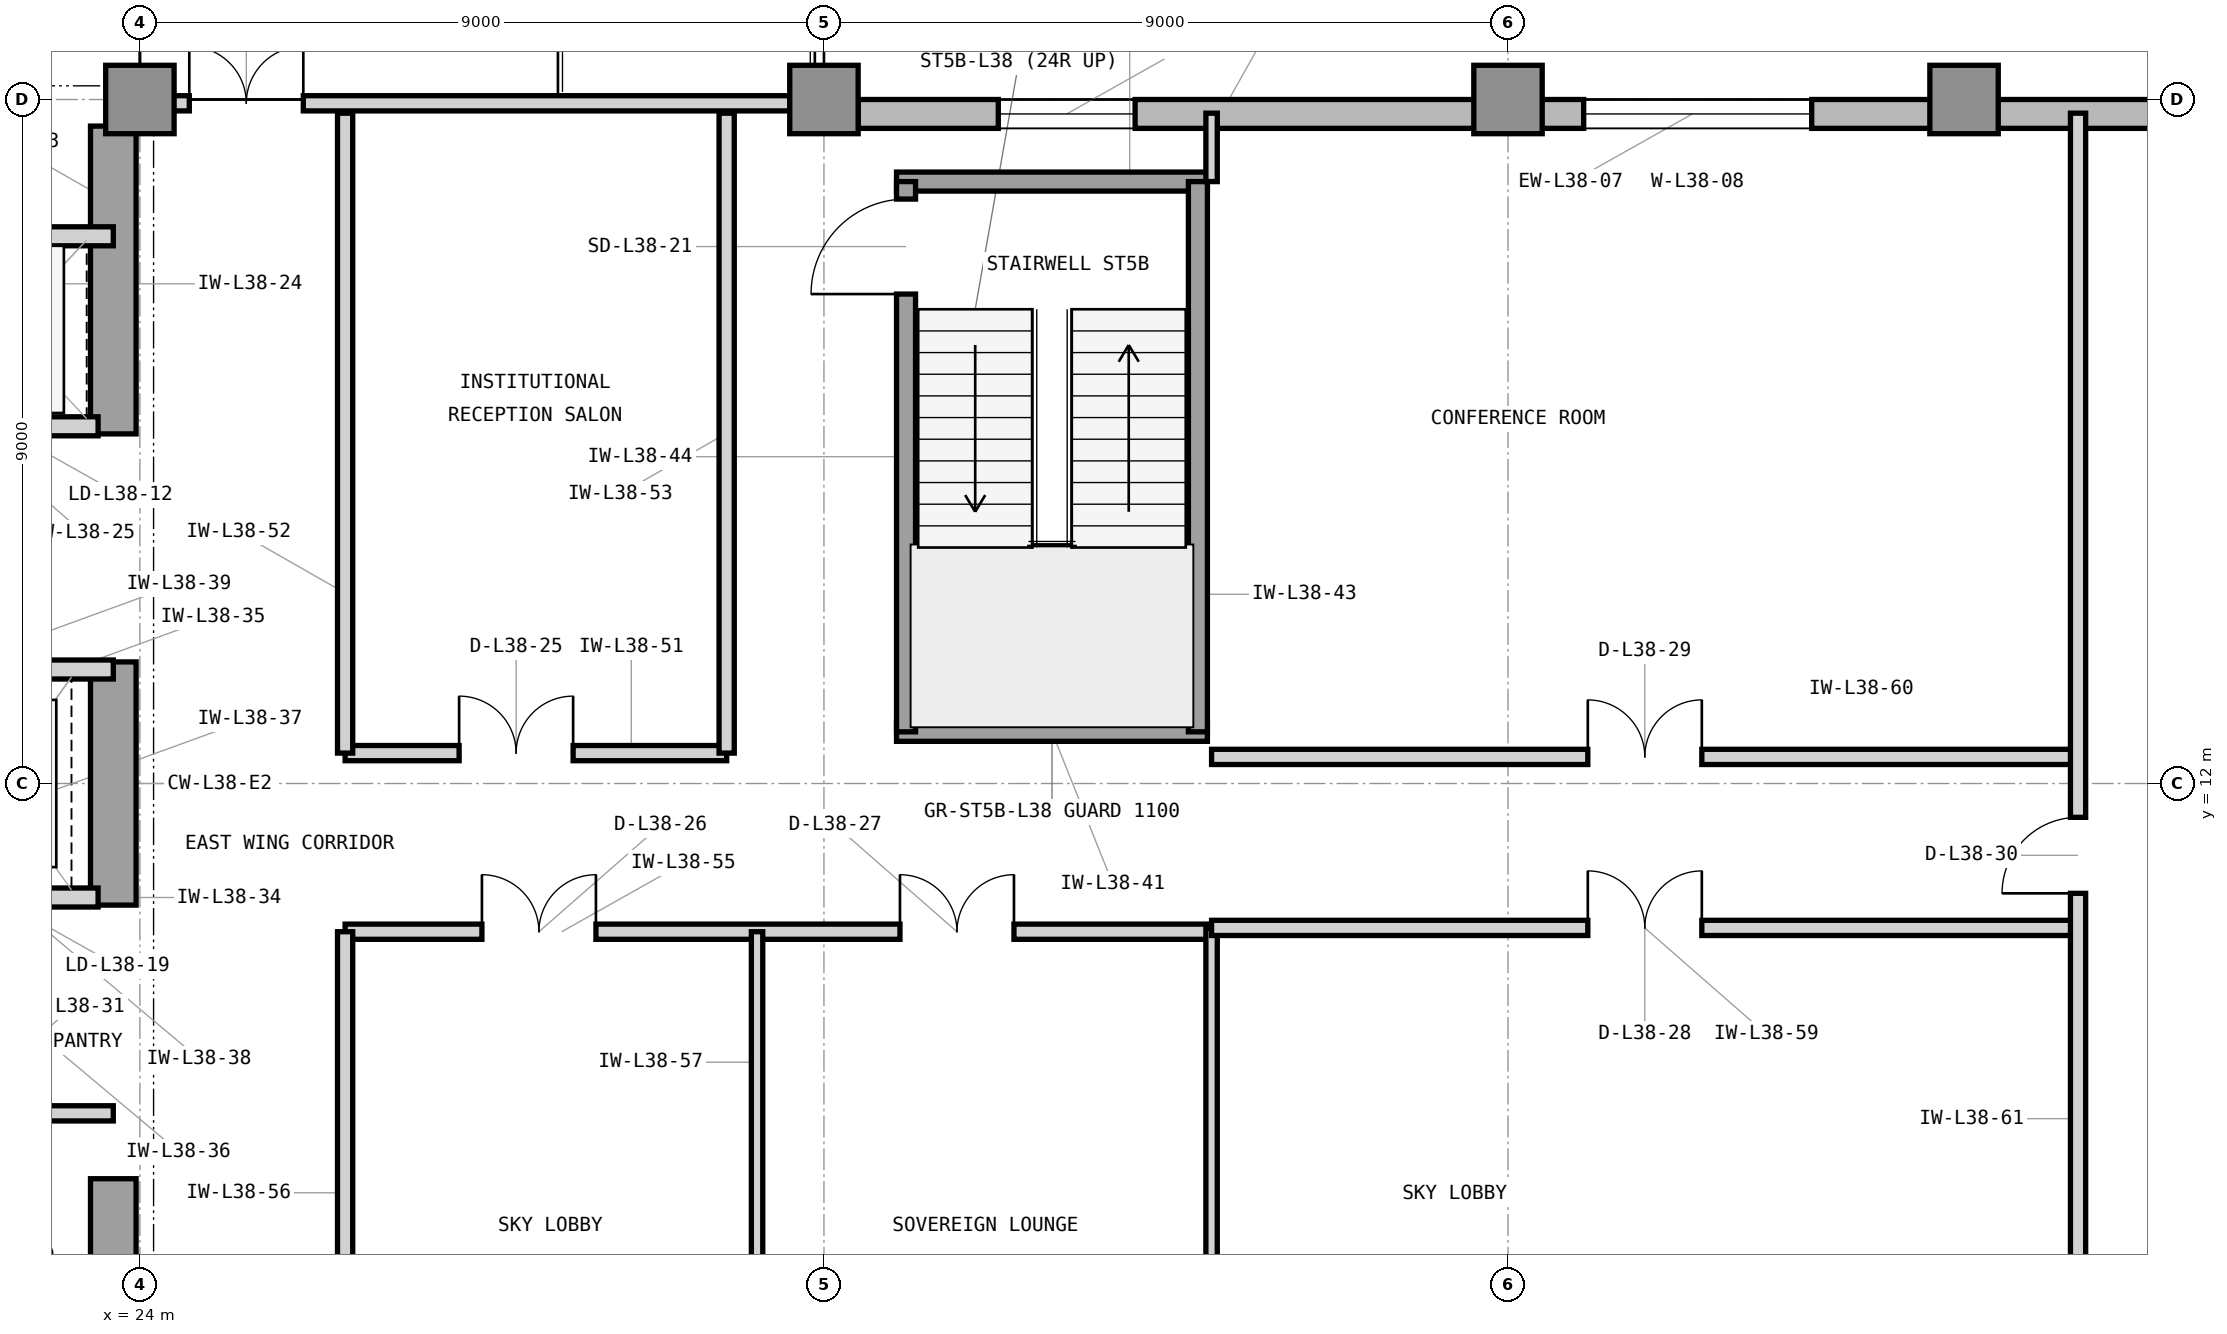
"""IFC4 building model, lengths in metres.
Left out: names, types, materials, properties, quantities, classifications, styles, units other than length and angle.
Written with IfcOpenShell. Run it as: python <this file> out.ifc"""

import sys

from ifc_helpers import new_model, si_unit, direction, frame, frame_2d, origin, origin_2d, place, context, subcontext, project, spatial, rectangle, extrude, element, fill, save


model = new_model("IFC4")
c1 = context("Model", 3, precision=1e-05, world=origin(), true_north=direction((0.0, 1.0)))
c2 = subcontext(c1, "Body", "Model", "MODEL_VIEW")
j1 = project(units=[si_unit("LENGTHUNIT", "METRE"), si_unit("PLANEANGLEUNIT", "RADIAN")], contexts=[c1])
p1 = place(None, origin())
s1 = spatial("IfcSite", under=j1, at=p1, CompositionType="ELEMENT")
p2 = place(p1, origin())
s2 = spatial("IfcBuilding", under=s1, at=p2, CompositionType="ELEMENT")
p3 = place(p2, frame((0.0, 0.0, 160.2)))
s3 = spatial("IfcBuildingStorey", under=s2, at=p3, CompositionType="ELEMENT", Elevation=160.2)
p4 = place(p3, frame((23.65, 3.65, 0.0), z_axis=(0.0, 0.0, 1.0), x_axis=(0.0, 1.0, 0.0)))
e1 = element("IfcWall", 1, at=p4, inside=s3, PredefinedType="SHEAR", context=c2, shape_type="SweptSolid", body=[
    extrude(rectangle(XDim=3.15, YDim=0.6, at=frame_2d((1.575, 0.0))), origin(), (0.0, 0.0, 1.0), 4.2),
])
p5 = place(p3, frame((23.65, 10.4, 0.0), z_axis=(0.0, 0.0, 1.0), x_axis=(0.0, 1.0, 0.0)))
e2 = element("IfcWall", 2, at=p5, inside=s3, PredefinedType="SHEAR", context=c2, shape_type="SweptSolid", body=[
    extrude(rectangle(XDim=3.2, YDim=0.6, at=frame_2d((1.6, 0.0))), origin(), (0.0, 0.0, 1.0), 4.2),
])
p6 = place(p3, frame((23.65, 16.6, 0.0), z_axis=(0.0, 0.0, 1.0), x_axis=(0.0, 1.0, 0.0)))
e3 = element("IfcWall", 3, at=p6, inside=s3, PredefinedType="SHEAR", context=c2, shape_type="SweptSolid", body=[
    extrude(rectangle(XDim=4.05, YDim=0.6, at=frame_2d((2.025, 0.0))), origin(), (0.0, 0.0, 1.0), 4.2),
])
for number, where, z_axis, x_axis in (
    (4, (24.0, 21.0, 0.0), (0.0, 0.0, 1.0), (1.0, 0.0, 0.0)),
    (5, (33.0, 21.0, 0.0), (0.0, 0.0, 1.0), (1.0, 0.0, 0.0)),
    (6, (42.0, 21.0, 0.0), (0.0, 0.0, 1.0), (1.0, 0.0, 0.0)),
    (7, (48.0, 21.0, 0.0), (0.0, 0.0, 1.0), (1.0, 0.0, 0.0)),
):
    element("IfcColumn", number, at=place(p3, frame(where, z_axis=z_axis, x_axis=x_axis)), inside=s3, PredefinedType="COLUMN", context=c2, shape_type="SweptSolid", body=[
        extrude(rectangle(XDim=0.9, YDim=0.9, at=origin_2d()), origin(), (0.0, 0.0, 1.0), 4.2),
    ])
p7 = place(p3, frame((55.4, 20.81, 0.0), z_axis=(0.0, 0.0, 1.0), x_axis=(-1.0, 0.0, 0.0)))
e8 = element("IfcWall", 8, at=p7, inside=s3, PredefinedType="STANDARD", context=c2, shape_type="SweptSolid", body=[
    extrude(rectangle(XDim=21.95, YDim=0.38, at=frame_2d((10.975, 0.0))), origin(), (0.0, 0.0, 1.0), 4.0),
])
p8 = place(p7, frame((18.306, 0.0, 0.85)))
e9 = element("IfcOpeningElement", 9, at=p8, cuts=e8, PredefinedType="OPENING", context=c2, shape_type="SweptSolid", body=[
    extrude(rectangle(XDim=1.8, YDim=2.25, at=frame_2d((0.9, 1.125))), frame((0.0, 0.2, 0.0), z_axis=(0.0, -1.0, 0.0), x_axis=(1.0, 0.0, 0.0)), (0.0, 0.0, 1.0), 0.4),
])
p9 = place(p7, frame((9.404, 0.0, 0.7)))
e10 = element("IfcOpeningElement", 10, at=p9, cuts=e8, PredefinedType="OPENING", context=c2, shape_type="SweptSolid", body=[
    extrude(rectangle(XDim=3.0, YDim=2.6, at=frame_2d((1.5, 1.3))), frame((0.0, 0.2, 0.0), z_axis=(0.0, -1.0, 0.0), x_axis=(1.0, 0.0, 0.0)), (0.0, 0.0, 1.0), 0.4),
])
p10 = place(p3, frame((21.05, 16.7, 0.0), z_axis=(0.0, 0.0, 1.0), x_axis=(1.0, 0.0, 0.0)))
e11 = element("IfcWall", 11, at=p10, inside=s3, PredefinedType="PARTITIONING", context=c2, shape_type="SweptSolid", body=[
    extrude(rectangle(XDim=2.4, YDim=0.25, at=frame_2d((1.2, 0.0))), origin(), (0.0, 0.0, 1.0), 3.583),
])
p11 = place(p10, frame((0.52, 0.0, 0.0)))
e12 = element("IfcOpeningElement", 12, at=p11, cuts=e11, PredefinedType="OPENING", context=c2, shape_type="SweptSolid", body=[
    extrude(rectangle(XDim=1.15, YDim=2.25, at=frame_2d((0.575, 1.125))), frame((0.0, 0.135, 0.0), z_axis=(0.0, -1.0, 0.0), x_axis=(1.0, 0.0, 0.0)), (0.0, 0.0, 1.0), 0.27),
])
p12 = place(p3, frame((16.45, 19.2, 0.0), z_axis=(0.0, 0.0, 1.0), x_axis=(1.0, 0.0, 0.0)))
e13 = element("IfcWall", 13, at=p12, inside=s3, PredefinedType="PARTITIONING", context=c2, shape_type="SweptSolid", body=[
    extrude(rectangle(XDim=7.2, YDim=0.25, at=frame_2d((3.6, 0.0))), origin(), (0.0, 0.0, 1.0), 3.93),
])
p13 = place(p3, frame((20.8, 7.66, 0.0), z_axis=(0.0, 0.0, 1.0), x_axis=(1.0, 0.0, 0.0)))
e14 = element("IfcWall", 14, at=p13, inside=s3, PredefinedType="PARTITIONING", context=c2, shape_type="SweptSolid", body=[
    extrude(rectangle(XDim=2.85, YDim=0.2, at=frame_2d((1.425, 0.0))), origin(), (0.0, 0.0, 1.0), 3.93),
])
p14 = place(p13, frame((0.95, 0.0, 0.0)))
e15 = element("IfcOpeningElement", 15, at=p14, cuts=e14, PredefinedType="OPENING", context=c2, shape_type="SweptSolid", body=[
    extrude(rectangle(XDim=0.95, YDim=2.1, at=frame_2d((0.475, 1.05))), frame((0.0, 0.11, 0.0), z_axis=(0.0, -1.0, 0.0), x_axis=(1.0, 0.0, 0.0)), (0.0, 0.0, 1.0), 0.22),
])
p15 = place(p3, frame((21.05, 10.5, 0.0), z_axis=(0.0, 0.0, 1.0), x_axis=(1.0, 0.0, 0.0)))
e16 = element("IfcWall", 16, at=p15, inside=s3, PredefinedType="PARTITIONING", context=c2, shape_type="SweptSolid", body=[
    extrude(rectangle(XDim=2.4, YDim=0.25, at=frame_2d((1.2, 0.0))), origin(), (0.0, 0.0, 1.0), 3.583),
])
p16 = place(p15, frame((0.48, 0.0, 0.0)))
e17 = element("IfcOpeningElement", 17, at=p16, cuts=e16, PredefinedType="OPENING", context=c2, shape_type="SweptSolid", body=[
    extrude(rectangle(XDim=1.15, YDim=2.25, at=frame_2d((0.575, 1.125))), frame((0.0, 0.135, 0.0), z_axis=(0.0, -1.0, 0.0), x_axis=(1.0, 0.0, 0.0)), (0.0, 0.0, 1.0), 0.27),
])
p17 = place(p3, frame((14.7, 13.5, 0.0), z_axis=(0.0, 0.0, 1.0), x_axis=(1.0, 0.0, 0.0)))
e18 = element("IfcWall", 18, at=p17, inside=s3, PredefinedType="PARTITIONING", context=c2, shape_type="SweptSolid", body=[
    extrude(rectangle(XDim=8.95, YDim=0.25, at=frame_2d((4.475, 0.0))), origin(), (0.0, 0.0, 1.0), 3.583),
])
for number, where, z_axis, x_axis in (
    (19, (33.955, 12.68, 0.0), (0.0, 0.0, 1.0), (1.0, 0.0, 0.0)),
    (20, (33.955, 19.92, 0.0), (0.0, 0.0, 1.0), (1.0, 0.0, 0.0)),
):
    element("IfcWall", number, at=place(p3, frame(where, z_axis=z_axis, x_axis=x_axis)), inside=s3, PredefinedType="SHEAR", context=c2, shape_type="SweptSolid", body=[
        extrude(rectangle(XDim=4.09, YDim=0.25, at=frame_2d((2.045, 0.0))), origin(), (0.0, 0.0, 1.0), 4.2),
    ])
p18 = place(p3, frame((37.92, 12.68, 0.0), z_axis=(0.0, 0.0, 1.0), x_axis=(0.0, 1.0, 0.0)))
e21 = element("IfcWall", 21, at=p18, inside=s3, PredefinedType="SHEAR", context=c2, shape_type="SweptSolid", body=[
    extrude(rectangle(XDim=7.24, YDim=0.25, at=frame_2d((3.62, 0.0))), origin(), (0.0, 0.0, 1.0), 4.2),
])
p19 = place(p3, frame((34.08, 12.68, 0.0), z_axis=(0.0, 0.0, 1.0), x_axis=(0.0, 1.0, 0.0)))
e22 = element("IfcWall", 22, at=p19, inside=s3, PredefinedType="SHEAR", context=c2, shape_type="SweptSolid", body=[
    extrude(rectangle(XDim=7.24, YDim=0.25, at=frame_2d((3.62, 0.0))), origin(), (0.0, 0.0, 1.0), 4.2),
])
p20 = place(p19, frame((5.76, 0.0, 0.0)))
e23 = element("IfcOpeningElement", 23, at=p20, cuts=e22, PredefinedType="OPENING", context=c2, shape_type="SweptSolid", body=[
    extrude(rectangle(XDim=1.25, YDim=2.2, at=frame_2d((0.625, 1.1))), frame((0.0, 0.135, 0.0), z_axis=(0.0, -1.0, 0.0), x_axis=(1.0, 0.0, 0.0)), (0.0, 0.0, 1.0), 0.27),
])
p21 = place(p3, frame((24.05, 20.95, 0.0), z_axis=(0.0, 0.0, 1.0), x_axis=(1.0, 0.0, 0.0)))
e24 = element("IfcWall", 24, at=p21, inside=s3, PredefinedType="PARTITIONING", context=c2, shape_type="SweptSolid", body=[
    extrude(rectangle(XDim=8.5, YDim=0.2, at=frame_2d((4.25, 0.0))), origin(), (0.0, 0.0, 1.0), 3.386),
])
p22 = place(p21, frame((0.6, 0.0, 0.0)))
e25 = element("IfcOpeningElement", 25, at=p22, cuts=e24, PredefinedType="OPENING", context=c2, shape_type="SweptSolid", body=[
    extrude(rectangle(XDim=1.5, YDim=2.3, at=frame_2d((0.75, 1.15))), frame((0.0, 0.11, 0.0), z_axis=(0.0, -1.0, 0.0), x_axis=(1.0, 0.0, 0.0)), (0.0, 0.0, 1.0), 0.22),
])
p23 = place(p3, frame((26.7, 12.4, 0.0), z_axis=(0.0, 0.0, 1.0), x_axis=(1.0, 0.0, 0.0)))
e26 = element("IfcWall", 26, at=p23, inside=s3, PredefinedType="PARTITIONING", context=c2, shape_type="SweptSolid", body=[
    extrude(rectangle(XDim=5.02, YDim=0.2, at=frame_2d((2.51, 0.0))), origin(), (0.0, 0.0, 1.0), 3.93),
])
p24 = place(p23, frame((1.5, 0.0, 0.0)))
e27 = element("IfcOpeningElement", 27, at=p24, cuts=e26, PredefinedType="OPENING", context=c2, shape_type="SweptSolid", body=[
    extrude(rectangle(XDim=1.5, YDim=2.3, at=frame_2d((0.75, 1.15))), frame((0.0, 0.11, 0.0), z_axis=(0.0, -1.0, 0.0), x_axis=(1.0, 0.0, 0.0)), (0.0, 0.0, 1.0), 0.22),
])
for number, where, z_axis, x_axis in (
    (28, (26.7, 12.4, 0.0), (0.0, 0.0, 1.0), (0.0, 1.0, 0.0)),
    (29, (31.72, 12.4, 0.0), (0.0, 0.0, 1.0), (0.0, 1.0, 0.0)),
):
    element("IfcWall", number, at=place(p3, frame(where, z_axis=z_axis, x_axis=x_axis)), inside=s3, PredefinedType="PARTITIONING", context=c2, shape_type="SweptSolid", body=[
        extrude(rectangle(XDim=8.42, YDim=0.2, at=frame_2d((4.21, 0.0))), origin(), (0.0, 0.0, 1.0), 3.93),
    ])
p25 = place(p3, frame((38.1, 19.92, 0.0), z_axis=(0.0, 0.0, 1.0), x_axis=(0.0, 1.0, 0.0)))
e30 = element("IfcWall", 30, at=p25, inside=s3, PredefinedType="PARTITIONING", context=c2, shape_type="SweptSolid", body=[
    extrude(rectangle(XDim=0.9, YDim=0.15, at=frame_2d((0.45, 0.0))), origin(), (0.0, 0.0, 1.0), 3.93),
])
p26 = place(p3, frame((26.7, 10.05, 0.0), z_axis=(0.0, 0.0, 1.0), x_axis=(1.0, 0.0, 0.0)))
e31 = element("IfcWall", 31, at=p26, inside=s3, PredefinedType="PARTITIONING", context=c2, shape_type="SweptSolid", body=[
    extrude(rectangle(XDim=11.4, YDim=0.2, at=frame_2d((5.7, 0.0))), origin(), (0.0, 0.0, 1.0), 3.93),
])
p27 = place(p26, frame((1.8, 0.0, 0.0)))
e32 = element("IfcOpeningElement", 32, at=p27, cuts=e31, PredefinedType="OPENING", context=c2, shape_type="SweptSolid", body=[
    extrude(rectangle(XDim=1.5, YDim=2.3, at=frame_2d((0.75, 1.15))), frame((0.0, 0.11, 0.0), z_axis=(0.0, -1.0, 0.0), x_axis=(1.0, 0.0, 0.0)), (0.0, 0.0, 1.0), 0.22),
])
p28 = place(p26, frame((7.3, 0.0, 0.0)))
e33 = element("IfcOpeningElement", 33, at=p28, cuts=e31, PredefinedType="OPENING", context=c2, shape_type="SweptSolid", body=[
    extrude(rectangle(XDim=1.5, YDim=2.3, at=frame_2d((0.75, 1.15))), frame((0.0, 0.11, 0.0), z_axis=(0.0, -1.0, 0.0), x_axis=(1.0, 0.0, 0.0)), (0.0, 0.0, 1.0), 0.22),
])
p29 = place(p3, frame((26.7, 3.18, 0.0), z_axis=(0.0, 0.0, 1.0), x_axis=(0.0, 1.0, 0.0)))
e34 = element("IfcWall", 34, at=p29, inside=s3, PredefinedType="PARTITIONING", context=c2, shape_type="SweptSolid", body=[
    extrude(rectangle(XDim=6.87, YDim=0.2, at=frame_2d((3.435, 0.0))), origin(), (0.0, 0.0, 1.0), 3.93),
])
p30 = place(p3, frame((32.12, 3.18, 0.0), z_axis=(0.0, 0.0, 1.0), x_axis=(0.0, 1.0, 0.0)))
e35 = element("IfcWall", 35, at=p30, inside=s3, PredefinedType="PARTITIONING", context=c2, shape_type="SweptSolid", body=[
    extrude(rectangle(XDim=6.87, YDim=0.15, at=frame_2d((3.435, 0.0))), origin(), (0.0, 0.0, 1.0), 3.93),
])
p31 = place(p3, frame((38.1, 3.18, 0.0), z_axis=(0.0, 0.0, 1.0), x_axis=(0.0, 1.0, 0.0)))
e36 = element("IfcWall", 36, at=p31, inside=s3, PredefinedType="PARTITIONING", context=c2, shape_type="SweptSolid", body=[
    extrude(rectangle(XDim=6.92, YDim=0.15, at=frame_2d((3.46, 0.0))), origin(), (0.0, 0.0, 1.0), 3.93),
])
p32 = place(p3, frame((38.1, 10.1, 0.0), z_axis=(0.0, 0.0, 1.0), x_axis=(1.0, 0.0, 0.0)))
e37 = element("IfcWall", 37, at=p32, inside=s3, PredefinedType="PARTITIONING", context=c2, shape_type="SweptSolid", body=[
    extrude(rectangle(XDim=11.4, YDim=0.2, at=frame_2d((5.7, 0.0))), origin(), (0.0, 0.0, 1.0), 3.93),
])
p33 = place(p32, frame((4.95, 0.0, 0.0)))
e38 = element("IfcOpeningElement", 38, at=p33, cuts=e37, PredefinedType="OPENING", context=c2, shape_type="SweptSolid", body=[
    extrude(rectangle(XDim=1.5, YDim=2.3, at=frame_2d((0.75, 1.15))), frame((0.0, 0.11, 0.0), z_axis=(0.0, -1.0, 0.0), x_axis=(1.0, 0.0, 0.0)), (0.0, 0.0, 1.0), 0.22),
])
p34 = place(p3, frame((38.1, 12.35, 0.0), z_axis=(0.0, 0.0, 1.0), x_axis=(1.0, 0.0, 0.0)))
e39 = element("IfcWall", 39, at=p34, inside=s3, PredefinedType="PARTITIONING", context=c2, shape_type="SweptSolid", body=[
    extrude(rectangle(XDim=11.4, YDim=0.2, at=frame_2d((5.7, 0.0))), origin(), (0.0, 0.0, 1.0), 3.93),
])
p35 = place(p34, frame((4.95, 0.0, 0.0)))
e40 = element("IfcOpeningElement", 40, at=p35, cuts=e39, PredefinedType="OPENING", context=c2, shape_type="SweptSolid", body=[
    extrude(rectangle(XDim=1.5, YDim=2.3, at=frame_2d((0.75, 1.15))), frame((0.0, 0.11, 0.0), z_axis=(0.0, -1.0, 0.0), x_axis=(1.0, 0.0, 0.0)), (0.0, 0.0, 1.0), 0.22),
])
p36 = place(p3, frame((49.5, 3.18, 0.0), z_axis=(0.0, 0.0, 1.0), x_axis=(0.0, 1.0, 0.0)))
e41 = element("IfcWall", 41, at=p36, inside=s3, PredefinedType="PARTITIONING", context=c2, shape_type="SweptSolid", body=[
    extrude(rectangle(XDim=17.64, YDim=0.2, at=frame_2d((8.82, 0.0))), origin(), (0.0, 0.0, 1.0), 3.93),
])
p37 = place(p36, frame((7.375, 0.0, 0.0)))
e42 = element("IfcOpeningElement", 42, at=p37, cuts=e41, PredefinedType="OPENING", context=c2, shape_type="SweptSolid", body=[
    extrude(rectangle(XDim=1.0, YDim=2.15, at=frame_2d((0.5, 1.075))), frame((0.0, 0.11, 0.0), z_axis=(0.0, -1.0, 0.0), x_axis=(1.0, 0.0, 0.0)), (0.0, 0.0, 1.0), 0.22),
])
p38 = place(p8, origin())
e43 = element("IfcWindow", 43, at=p38, inside=s3, PartitioningType="SINGLE_PANEL", PredefinedType="WINDOW", context=c2, shape_type="SweptSolid", body=[
    extrude(rectangle(XDim=1.8, YDim=2.25, at=frame_2d((0.9, 1.125))), frame((0.0, 0.11, 0.0), z_axis=(0.0, -1.0, 0.0), x_axis=(1.0, 0.0, 0.0)), (0.0, 0.0, 1.0), 0.06),
])
fill(e9, e43)
p39 = place(p20, origin())
e44 = element("IfcDoor", 44, at=p39, inside=s3, OperationType="SINGLE_SWING_LEFT", PredefinedType="DOOR", context=c2, shape_type="SweptSolid", body=[
    extrude(rectangle(XDim=1.25, YDim=2.2, at=frame_2d((0.625, 1.1))), frame((0.0, 0.025, 0.0), z_axis=(0.0, -1.0, 0.0), x_axis=(1.0, 0.0, 0.0)), (0.0, 0.0, 1.0), 0.05),
])
fill(e23, e44)
p40 = place(p22, origin())
e45 = element("IfcDoor", 45, at=p40, inside=s3, OperationType="DOUBLE_DOOR_SINGLE_SWING", PredefinedType="DOOR", context=c2, shape_type="SweptSolid", body=[
    extrude(rectangle(XDim=1.5, YDim=2.3, at=frame_2d((0.75, 1.15))), frame((0.0, 0.025, 0.0), z_axis=(0.0, -1.0, 0.0), x_axis=(1.0, 0.0, 0.0)), (0.0, 0.0, 1.0), 0.05),
])
fill(e25, e45)
p41 = place(p24, origin())
e46 = element("IfcDoor", 46, at=p41, inside=s3, OperationType="DOUBLE_DOOR_SINGLE_SWING", PredefinedType="DOOR", context=c2, shape_type="SweptSolid", body=[
    extrude(rectangle(XDim=1.5, YDim=2.3, at=frame_2d((0.75, 1.15))), frame((0.0, 0.025, 0.0), z_axis=(0.0, -1.0, 0.0), x_axis=(1.0, 0.0, 0.0)), (0.0, 0.0, 1.0), 0.05),
])
fill(e27, e46)
p42 = place(p27, origin())
e47 = element("IfcDoor", 47, at=p42, inside=s3, OperationType="DOUBLE_DOOR_SINGLE_SWING", PredefinedType="DOOR", context=c2, shape_type="SweptSolid", body=[
    extrude(rectangle(XDim=1.5, YDim=2.3, at=frame_2d((0.75, 1.15))), frame((0.0, 0.025, 0.0), z_axis=(0.0, -1.0, 0.0), x_axis=(1.0, 0.0, 0.0)), (0.0, 0.0, 1.0), 0.05),
])
fill(e32, e47)
p43 = place(p28, origin())
e48 = element("IfcDoor", 48, at=p43, inside=s3, OperationType="DOUBLE_DOOR_SINGLE_SWING", PredefinedType="DOOR", context=c2, shape_type="SweptSolid", body=[
    extrude(rectangle(XDim=1.5, YDim=2.3, at=frame_2d((0.75, 1.15))), frame((0.0, 0.025, 0.0), z_axis=(0.0, -1.0, 0.0), x_axis=(1.0, 0.0, 0.0)), (0.0, 0.0, 1.0), 0.05),
])
fill(e33, e48)
p44 = place(p33, origin())
e49 = element("IfcDoor", 49, at=p44, inside=s3, OperationType="DOUBLE_DOOR_SINGLE_SWING", PredefinedType="DOOR", context=c2, shape_type="SweptSolid", body=[
    extrude(rectangle(XDim=1.5, YDim=2.3, at=frame_2d((0.75, 1.15))), frame((0.0, 0.025, 0.0), z_axis=(0.0, -1.0, 0.0), x_axis=(1.0, 0.0, 0.0)), (0.0, 0.0, 1.0), 0.05),
])
fill(e38, e49)
p45 = place(p35, origin())
e50 = element("IfcDoor", 50, at=p45, inside=s3, OperationType="DOUBLE_DOOR_SINGLE_SWING", PredefinedType="DOOR", context=c2, shape_type="SweptSolid", body=[
    extrude(rectangle(XDim=1.5, YDim=2.3, at=frame_2d((0.75, 1.15))), frame((0.0, 0.025, 0.0), z_axis=(0.0, -1.0, 0.0), x_axis=(1.0, 0.0, 0.0)), (0.0, 0.0, 1.0), 0.05),
])
fill(e40, e50)
p46 = place(p37, origin())
e51 = element("IfcDoor", 51, at=p46, inside=s3, OperationType="SINGLE_SWING_LEFT", PredefinedType="DOOR", context=c2, shape_type="SweptSolid", body=[
    extrude(rectangle(XDim=1.0, YDim=2.15, at=frame_2d((0.5, 1.075))), frame((0.0, 0.025, 0.0), z_axis=(0.0, -1.0, 0.0), x_axis=(1.0, 0.0, 0.0)), (0.0, 0.0, 1.0), 0.05),
])
fill(e42, e51)
p47 = place(p9, origin())
e52 = element("IfcWindow", 52, at=p47, inside=s3, PartitioningType="SINGLE_PANEL", PredefinedType="WINDOW", context=c2, shape_type="SweptSolid", body=[
    extrude(rectangle(XDim=3.0, YDim=2.6, at=frame_2d((1.5, 1.3))), frame((0.0, 0.11, 0.0), z_axis=(0.0, -1.0, 0.0), x_axis=(1.0, 0.0, 0.0)), (0.0, 0.0, 1.0), 0.06),
])
fill(e10, e52)
save(model, sys.argv[1])
